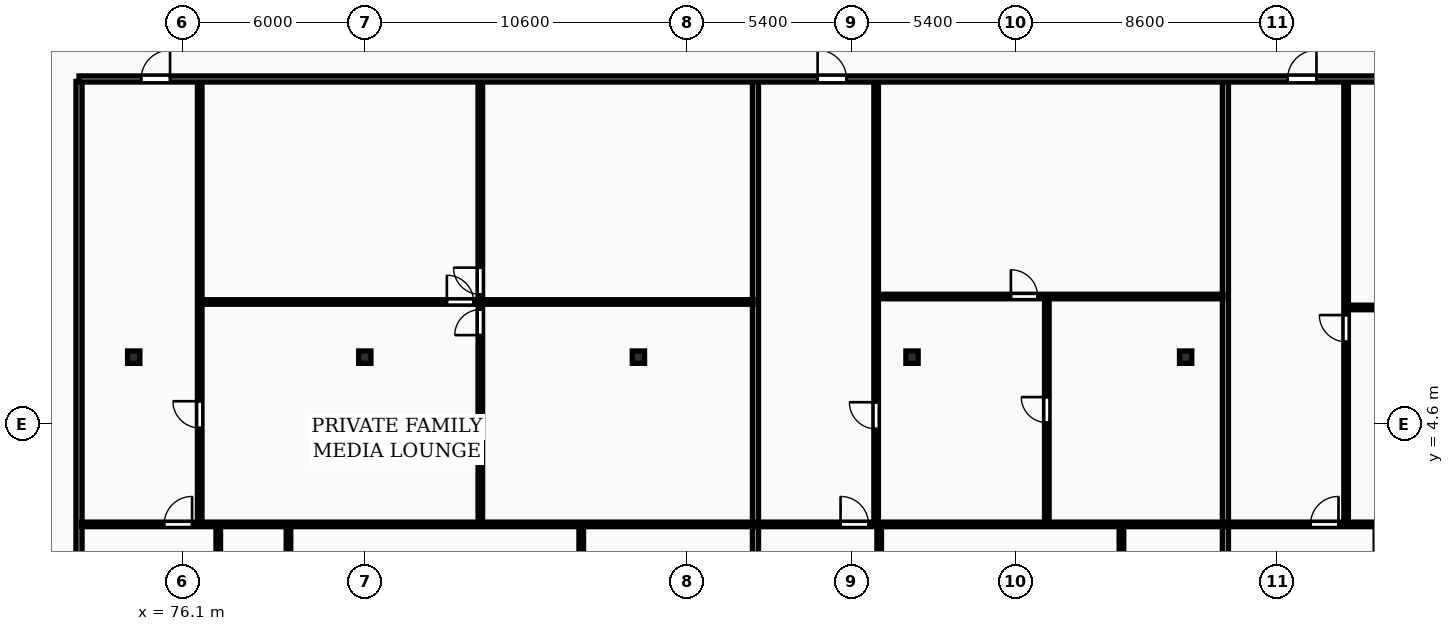
"""IFC4 building model, lengths in metres.
Left out: names, types, materials, properties, quantities, classifications, styles, units other than length and angle.
Written with IfcOpenShell. Run it as: python <this file> out.ifc"""

import sys

from ifc_helpers import new_model, si_unit, direction, frame, frame_2d, origin, origin_2d, place, context, subcontext, project, spatial, rectangle, i_section, extrude, element, fill, save


model = new_model("IFC4")
c1 = context("Model", 3, precision=1e-05, world=origin(), true_north=direction((0.0, 1.0)))
c2 = subcontext(c1, "Body", "Model", "MODEL_VIEW")
j1 = project(units=[si_unit("LENGTHUNIT", "METRE"), si_unit("PLANEANGLEUNIT", "RADIAN")], contexts=[c1])
p1 = place(None, origin())
s1 = spatial("IfcSite", under=j1, at=p1, CompositionType="ELEMENT")
p2 = place(p1, origin())
s2 = spatial("IfcBuilding", under=s1, at=p2, CompositionType="ELEMENT")
p3 = place(p2, frame((0.0, 0.0, 142.9)))
s3 = spatial("IfcBuildingStorey", under=s2, at=p3, CompositionType="ELEMENT", Elevation=142.9)
for number, where, z_axis, x_axis in (
    (1, (74.5, 6.8, 0.0), (0.0, 0.0, 1.0), (1.0, 0.0, 0.0)),
    (2, (82.1, 6.8, 0.0), (0.0, 0.0, 1.0), (1.0, 0.0, 0.0)),
    (3, (91.1, 6.8, 0.0), (0.0, 0.0, 1.0), (1.0, 0.0, 0.0)),
    (4, (100.1, 6.8, 0.0), (0.0, 0.0, 1.0), (1.0, 0.0, 0.0)),
    (5, (109.1, 6.8, 0.0), (0.0, 0.0, 1.0), (1.0, 0.0, 0.0)),
):
    element("IfcColumn", number, at=place(p3, frame(where, z_axis=z_axis, x_axis=x_axis)), inside=s3, PredefinedType="COLUMN", context=c2, shape_type="SweptSolid", body=[
        extrude(i_section(OverallWidth=0.403, OverallDepth=0.406, WebThickness=0.027, FlangeThickness=0.043, FilletRadius=0.015, at=origin_2d()), origin(), (0.0, 0.0, 1.0), 3.6),
    ])
for number, where, z_axis, x_axis in (
    (6, (72.7, -8.7, 0.0), (0.0, 0.0, 1.0), (0.0, 1.0, 0.0)),
    (7, (94.95, -8.7, 0.0), (0.0, 0.0, 1.0), (0.0, 1.0, 0.0)),
):
    element("IfcWall", number, at=place(p3, frame(where, z_axis=z_axis, x_axis=x_axis)), inside=s3, PredefinedType="PARTITIONING", context=c2, shape_type="SweptSolid", body=[
        extrude(rectangle(XDim=24.57, YDim=0.2, at=frame_2d((12.285, 0.0))), origin(), (0.0, 0.0, 1.0), 3.31),
    ])
p4 = place(p3, frame((85.9, 1.34, 0.0), z_axis=(0.0, 0.0, 1.0), x_axis=(0.0, 1.0, 0.0)))
e8 = element("IfcWall", 8, at=p4, inside=s3, PredefinedType="PARTITIONING", context=c2, shape_type="SweptSolid", body=[
    extrude(rectangle(XDim=14.55, YDim=0.15, at=frame_2d((7.275, 0.0))), origin(), (0.0, 0.0, 1.0), 3.31),
])
p5 = place(p4, frame((6.185, 0.0, 0.0)))
e9 = element("IfcOpeningElement", 9, at=p5, cuts=e8, PredefinedType="OPENING", context=c2, shape_type="SweptSolid", body=[
    extrude(rectangle(XDim=0.84, YDim=2.04, at=frame_2d((0.42, 1.02))), frame((0.0, 0.085, 0.0), z_axis=(0.0, -1.0, 0.0), x_axis=(1.0, 0.0, 0.0)), (0.0, 0.0, 1.0), 0.17),
])
p6 = place(p4, frame((7.525, 0.0, 0.0)))
e10 = element("IfcOpeningElement", 10, at=p6, cuts=e8, PredefinedType="OPENING", context=c2, shape_type="SweptSolid", body=[
    extrude(rectangle(XDim=0.88, YDim=2.06, at=frame_2d((0.44, 1.03))), frame((0.0, 0.085, 0.0), z_axis=(0.0, -1.0, 0.0), x_axis=(1.0, 0.0, 0.0)), (0.0, 0.0, 1.0), 0.17),
])
p7 = place(p3, frame((76.73, 8.615, 0.0), z_axis=(0.0, 0.0, 1.0), x_axis=(1.0, 0.0, 0.0)))
e11 = element("IfcWall", 11, at=p7, inside=s3, PredefinedType="PARTITIONING", context=c2, shape_type="SweptSolid", body=[
    extrude(rectangle(XDim=18.14, YDim=0.15, at=frame_2d((9.07, 0.0))), origin(), (0.0, 0.0, 1.0), 3.31),
])
p8 = place(p7, frame((8.07, 0.0, 0.0)))
e12 = element("IfcOpeningElement", 12, at=p8, cuts=e11, PredefinedType="OPENING", context=c2, shape_type="SweptSolid", body=[
    extrude(rectangle(XDim=0.88, YDim=2.06, at=frame_2d((0.44, 1.03))), frame((0.0, 0.085, 0.0), z_axis=(0.0, -1.0, 0.0), x_axis=(1.0, 0.0, 0.0)), (0.0, 0.0, 1.0), 0.17),
])
p9 = place(p3, frame((76.67, 1.34, 0.0), z_axis=(0.0, 0.0, 1.0), x_axis=(0.0, 1.0, 0.0)))
e13 = element("IfcWall", 13, at=p9, inside=s3, PredefinedType="PARTITIONING", context=c2, shape_type="SweptSolid", body=[
    extrude(rectangle(XDim=14.55, YDim=0.15, at=frame_2d((7.275, 0.0))), origin(), (0.0, 0.0, 1.0), 3.31),
])
p10 = place(p9, frame((3.132, 0.0, 0.0)))
e14 = element("IfcOpeningElement", 14, at=p10, cuts=e13, PredefinedType="OPENING", context=c2, shape_type="SweptSolid", body=[
    extrude(rectangle(XDim=0.88, YDim=2.06, at=frame_2d((0.44, 1.03))), frame((0.0, 0.085, 0.0), z_axis=(0.0, -1.0, 0.0), x_axis=(1.0, 0.0, 0.0)), (0.0, 0.0, 1.0), 0.17),
])
p11 = place(p3, frame((79.59, -1.32, 0.0), z_axis=(0.0, 0.0, 1.0), x_axis=(0.0, 1.0, 0.0)))
e15 = element("IfcWall", 15, at=p11, inside=s3, PredefinedType="PARTITIONING", context=c2, shape_type="SweptSolid", body=[
    extrude(rectangle(XDim=2.58, YDim=0.15, at=frame_2d((1.29, 0.0))), origin(), (0.0, 0.0, 1.0), 3.31),
])
p12 = place(p3, frame((77.28, -8.7, 0.0), z_axis=(0.0, 0.0, 1.0), x_axis=(0.0, 1.0, 0.0)))
e16 = element("IfcWall", 16, at=p12, inside=s3, PredefinedType="PARTITIONING", context=c2, shape_type="SweptSolid", body=[
    extrude(rectangle(XDim=9.96, YDim=0.15, at=frame_2d((4.98, 0.0))), origin(), (0.0, 0.0, 1.0), 3.31),
])
p13 = place(p12, frame((5.22, 0.0, 0.0)))
e17 = element("IfcOpeningElement", 17, at=p13, cuts=e16, PredefinedType="OPENING", context=c2, shape_type="SweptSolid", body=[
    extrude(rectangle(XDim=0.92, YDim=2.08, at=frame_2d((0.46, 1.04))), frame((0.0, 0.085, 0.0), z_axis=(0.0, -1.0, 0.0), x_axis=(1.0, 0.0, 0.0)), (0.0, 0.0, 1.0), 0.17),
])
p14 = place(p3, frame((89.22, -1.32, 0.0), z_axis=(0.0, 0.0, 1.0), x_axis=(0.0, 1.0, 0.0)))
e18 = element("IfcWall", 18, at=p14, inside=s3, PredefinedType="PARTITIONING", context=c2, shape_type="SweptSolid", body=[
    extrude(rectangle(XDim=2.58, YDim=0.15, at=frame_2d((1.29, 0.0))), origin(), (0.0, 0.0, 1.0), 3.31),
])
p15 = place(p3, frame((72.78, 1.3, 0.0), z_axis=(0.0, 0.0, 1.0), x_axis=(1.0, 0.0, 0.0)))
e19 = element("IfcWall", 19, at=p15, inside=s3, PredefinedType="PARTITIONING", context=c2, shape_type="SweptSolid", body=[
    extrude(rectangle(XDim=22.09, YDim=0.15, at=frame_2d((11.045, 0.0))), origin(), (0.0, 0.0, 1.0), 3.31),
])
p16 = place(p15, frame((2.72, 0.0, 0.0)))
e20 = element("IfcOpeningElement", 20, at=p16, cuts=e19, PredefinedType="OPENING", context=c2, shape_type="SweptSolid", body=[
    extrude(rectangle(XDim=0.92, YDim=2.08, at=frame_2d((0.46, 1.04))), frame((0.0, 0.085, 0.0), z_axis=(0.0, -1.0, 0.0), x_axis=(1.0, 0.0, 0.0)), (0.0, 0.0, 1.0), 0.17),
])
p17 = place(p3, frame((110.408, -8.7, 0.0), z_axis=(0.0, 0.0, 1.0), x_axis=(0.0, 1.0, 0.0)))
e21 = element("IfcWall", 21, at=p17, inside=s3, PredefinedType="PARTITIONING", context=c2, shape_type="SweptSolid", body=[
    extrude(rectangle(XDim=24.57, YDim=0.2, at=frame_2d((12.285, 0.0))), origin(), (0.0, 0.0, 1.0), 3.31),
])
p18 = place(p3, frame((104.534, 1.34, 0.0), z_axis=(0.0, 0.0, 1.0), x_axis=(0.0, 1.0, 0.0)))
e22 = element("IfcWall", 22, at=p18, inside=s3, PredefinedType="PARTITIONING", context=c2, shape_type="SweptSolid", body=[
    extrude(rectangle(XDim=7.455, YDim=0.15, at=frame_2d((3.728, 0.0))), origin(), (0.0, 0.0, 1.0), 3.31),
])
p19 = place(p18, frame((3.308, 0.0, 0.0)))
e23 = element("IfcOpeningElement", 23, at=p19, cuts=e22, PredefinedType="OPENING", context=c2, shape_type="SweptSolid", body=[
    extrude(rectangle(XDim=0.84, YDim=2.04, at=frame_2d((0.42, 1.02))), frame((0.0, 0.085, 0.0), z_axis=(0.0, -1.0, 0.0), x_axis=(1.0, 0.0, 0.0)), (0.0, 0.0, 1.0), 0.17),
])
p20 = place(p3, frame((98.98, 8.795, 0.0), z_axis=(0.0, 0.0, 1.0), x_axis=(1.0, 0.0, 0.0)))
e24 = element("IfcWall", 24, at=p20, inside=s3, PredefinedType="PARTITIONING", context=c2, shape_type="SweptSolid", body=[
    extrude(rectangle(XDim=11.348, YDim=0.15, at=frame_2d((5.674, 0.0))), origin(), (0.0, 0.0, 1.0), 3.31),
])
p21 = place(p20, frame((4.372, 0.0, 0.0)))
e25 = element("IfcOpeningElement", 25, at=p21, cuts=e24, PredefinedType="OPENING", context=c2, shape_type="SweptSolid", body=[
    extrude(rectangle(XDim=0.88, YDim=2.06, at=frame_2d((0.44, 1.03))), frame((0.0, 0.085, 0.0), z_axis=(0.0, -1.0, 0.0), x_axis=(1.0, 0.0, 0.0)), (0.0, 0.0, 1.0), 0.17),
])
p22 = place(p3, frame((98.92, 1.34, 0.0), z_axis=(0.0, 0.0, 1.0), x_axis=(0.0, 1.0, 0.0)))
e26 = element("IfcWall", 26, at=p22, inside=s3, PredefinedType="PARTITIONING", context=c2, shape_type="SweptSolid", body=[
    extrude(rectangle(XDim=14.55, YDim=0.15, at=frame_2d((7.275, 0.0))), origin(), (0.0, 0.0, 1.0), 3.31),
])
p23 = place(p22, frame((3.098, 0.0, 0.0)))
e27 = element("IfcOpeningElement", 27, at=p23, cuts=e26, PredefinedType="OPENING", context=c2, shape_type="SweptSolid", body=[
    extrude(rectangle(XDim=0.88, YDim=2.06, at=frame_2d((0.44, 1.03))), frame((0.0, 0.085, 0.0), z_axis=(0.0, -1.0, 0.0), x_axis=(1.0, 0.0, 0.0)), (0.0, 0.0, 1.0), 0.17),
])
p24 = place(p3, frame((99.02, -3.74, 0.0), z_axis=(0.0, 0.0, 1.0), x_axis=(0.0, 1.0, 0.0)))
e28 = element("IfcWall", 28, at=p24, inside=s3, PredefinedType="PARTITIONING", context=c2, shape_type="SweptSolid", body=[
    extrude(rectangle(XDim=5.0, YDim=0.15, at=frame_2d((2.5, 0.0))), origin(), (0.0, 0.0, 1.0), 3.31),
])
p25 = place(p24, frame((2.06, 0.0, 0.0)))
e29 = element("IfcOpeningElement", 29, at=p25, cuts=e28, PredefinedType="OPENING", context=c2, shape_type="SweptSolid", body=[
    extrude(rectangle(XDim=0.88, YDim=2.06, at=frame_2d((0.44, 1.03))), frame((0.0, 0.085, 0.0), z_axis=(0.0, -1.0, 0.0), x_axis=(1.0, 0.0, 0.0)), (0.0, 0.0, 1.0), 0.17),
])
p26 = place(p3, frame((106.988, -8.7, 0.0), z_axis=(0.0, 0.0, 1.0), x_axis=(0.0, 1.0, 0.0)))
e30 = element("IfcWall", 30, at=p26, inside=s3, PredefinedType="PARTITIONING", context=c2, shape_type="SweptSolid", body=[
    extrude(rectangle(XDim=9.96, YDim=0.15, at=frame_2d((4.98, 0.0))), origin(), (0.0, 0.0, 1.0), 3.31),
])
p27 = place(p26, frame((5.894, 0.0, 0.0)))
e31 = element("IfcOpeningElement", 31, at=p27, cuts=e30, PredefinedType="OPENING", context=c2, shape_type="SweptSolid", body=[
    extrude(rectangle(XDim=0.84, YDim=2.04, at=frame_2d((0.42, 1.02))), frame((0.0, 0.085, 0.0), z_axis=(0.0, -1.0, 0.0), x_axis=(1.0, 0.0, 0.0)), (0.0, 0.0, 1.0), 0.17),
])
p28 = place(p26, frame((7.69, 0.0, 0.0)))
e32 = element("IfcOpeningElement", 32, at=p28, cuts=e30, PredefinedType="OPENING", context=c2, shape_type="SweptSolid", body=[
    extrude(rectangle(XDim=0.84, YDim=2.04, at=frame_2d((0.42, 1.02))), frame((0.0, 0.085, 0.0), z_axis=(0.0, -1.0, 0.0), x_axis=(1.0, 0.0, 0.0)), (0.0, 0.0, 1.0), 0.17),
])
p29 = place(p26, frame((2.223, 0.0, 0.0)))
e33 = element("IfcOpeningElement", 33, at=p29, cuts=e30, PredefinedType="OPENING", context=c2, shape_type="SweptSolid", body=[
    extrude(rectangle(XDim=0.88, YDim=2.06, at=frame_2d((0.44, 1.03))), frame((0.0, 0.085, 0.0), z_axis=(0.0, -1.0, 0.0), x_axis=(1.0, 0.0, 0.0)), (0.0, 0.0, 1.0), 0.17),
])
p30 = place(p3, frame((95.03, 1.3, 0.0), z_axis=(0.0, 0.0, 1.0), x_axis=(1.0, 0.0, 0.0)))
e34 = element("IfcWall", 34, at=p30, inside=s3, PredefinedType="PARTITIONING", context=c2, shape_type="SweptSolid", body=[
    extrude(rectangle(XDim=15.298, YDim=0.15, at=frame_2d((7.649, 0.0))), origin(), (0.0, 0.0, 1.0), 3.31),
])
p31 = place(p30, frame((2.72, 0.0, 0.0)))
e35 = element("IfcOpeningElement", 35, at=p31, cuts=e34, PredefinedType="OPENING", context=c2, shape_type="SweptSolid", body=[
    extrude(rectangle(XDim=0.92, YDim=2.08, at=frame_2d((0.46, 1.04))), frame((0.0, 0.085, 0.0), z_axis=(0.0, -1.0, 0.0), x_axis=(1.0, 0.0, 0.0)), (0.0, 0.0, 1.0), 0.17),
])
p32 = place(p3, frame((114.438, 8.435, 0.0), z_axis=(0.0, 0.0, 1.0), x_axis=(1.0, 0.0, 0.0)))
e36 = element("IfcWall", 36, at=p32, inside=s3, PredefinedType="PARTITIONING", context=c2, shape_type="SweptSolid", body=[
    extrude(rectangle(XDim=16.182, YDim=0.15, at=frame_2d((8.091, 0.0))), origin(), (0.0, 0.0, 1.0), 3.31),
])
p33 = place(p32, frame((6.821, 0.0, 0.0)))
e37 = element("IfcOpeningElement", 37, at=p33, cuts=e36, PredefinedType="OPENING", context=c2, shape_type="SweptSolid", body=[
    extrude(rectangle(XDim=0.88, YDim=2.06, at=frame_2d((0.44, 1.03))), frame((0.0, 0.085, 0.0), z_axis=(0.0, -1.0, 0.0), x_axis=(1.0, 0.0, 0.0)), (0.0, 0.0, 1.0), 0.17),
])
p34 = place(p3, frame((114.378, 1.34, 0.0), z_axis=(0.0, 0.0, 1.0), x_axis=(0.0, 1.0, 0.0)))
e38 = element("IfcWall", 38, at=p34, inside=s3, PredefinedType="PARTITIONING", context=c2, shape_type="SweptSolid", body=[
    extrude(rectangle(XDim=14.55, YDim=0.15, at=frame_2d((7.275, 0.0))), origin(), (0.0, 0.0, 1.0), 3.31),
])
p35 = place(p34, frame((5.965, 0.0, 0.0)))
e39 = element("IfcOpeningElement", 39, at=p35, cuts=e38, PredefinedType="OPENING", context=c2, shape_type="SweptSolid", body=[
    extrude(rectangle(XDim=0.88, YDim=2.06, at=frame_2d((0.44, 1.03))), frame((0.0, 0.085, 0.0), z_axis=(0.0, -1.0, 0.0), x_axis=(1.0, 0.0, 0.0)), (0.0, 0.0, 1.0), 0.17),
])
p36 = place(p3, frame((110.488, 1.3, 0.0), z_axis=(0.0, 0.0, 1.0), x_axis=(1.0, 0.0, 0.0)))
e40 = element("IfcWall", 40, at=p36, inside=s3, PredefinedType="PARTITIONING", context=c2, shape_type="SweptSolid", body=[
    extrude(rectangle(XDim=20.132, YDim=0.15, at=frame_2d((10.066, 0.0))), origin(), (0.0, 0.0, 1.0), 3.31),
])
p37 = place(p36, frame((2.72, 0.0, 0.0)))
e41 = element("IfcOpeningElement", 41, at=p37, cuts=e40, PredefinedType="OPENING", context=c2, shape_type="SweptSolid", body=[
    extrude(rectangle(XDim=0.92, YDim=2.08, at=frame_2d((0.46, 1.04))), frame((0.0, 0.085, 0.0), z_axis=(0.0, -1.0, 0.0), x_axis=(1.0, 0.0, 0.0)), (0.0, 0.0, 1.0), 0.17),
])
p38 = place(p3, frame((72.7, 15.95, 0.0), z_axis=(0.0, 0.0, 1.0), x_axis=(1.0, 0.0, 0.0)))
e42 = element("IfcWall", 42, at=p38, inside=s3, PredefinedType="PARTITIONING", context=c2, shape_type="SweptSolid", body=[
    extrude(rectangle(XDim=58.0, YDim=0.2, at=frame_2d((29.0, 0.0))), origin(), (0.0, 0.0, 1.0), 3.31),
])
p39 = place(p38, frame((2.045, 0.0, 0.0)))
e43 = element("IfcOpeningElement", 43, at=p39, cuts=e42, PredefinedType="OPENING", context=c2, shape_type="SweptSolid", body=[
    extrude(rectangle(XDim=0.95, YDim=2.15, at=frame_2d((0.475, 1.075))), frame((0.0, 0.11, 0.0), z_axis=(0.0, -1.0, 0.0), x_axis=(1.0, 0.0, 0.0)), (0.0, 0.0, 1.0), 0.22),
])
p40 = place(p38, frame((24.295, 0.0, 0.0)))
e44 = element("IfcOpeningElement", 44, at=p40, cuts=e42, PredefinedType="OPENING", context=c2, shape_type="SweptSolid", body=[
    extrude(rectangle(XDim=0.95, YDim=2.15, at=frame_2d((0.475, 1.075))), frame((0.0, 0.11, 0.0), z_axis=(0.0, -1.0, 0.0), x_axis=(1.0, 0.0, 0.0)), (0.0, 0.0, 1.0), 0.22),
])
p41 = place(p38, frame((39.753, 0.0, 0.0)))
e45 = element("IfcOpeningElement", 45, at=p41, cuts=e42, PredefinedType="OPENING", context=c2, shape_type="SweptSolid", body=[
    extrude(rectangle(XDim=0.95, YDim=2.15, at=frame_2d((0.475, 1.075))), frame((0.0, 0.11, 0.0), z_axis=(0.0, -1.0, 0.0), x_axis=(1.0, 0.0, 0.0)), (0.0, 0.0, 1.0), 0.22),
])
p42 = place(p5, origin())
e46 = element("IfcDoor", 46, at=p42, inside=s3, OperationType="SINGLE_SWING_LEFT", PredefinedType="DOOR", context=c2, shape_type="SweptSolid", body=[
    extrude(rectangle(XDim=0.84, YDim=2.04, at=frame_2d((0.42, 1.02))), frame((0.0, 0.025, 0.0), z_axis=(0.0, -1.0, 0.0), x_axis=(1.0, 0.0, 0.0)), (0.0, 0.0, 1.0), 0.05),
])
fill(e9, e46)
p43 = place(p6, origin())
e47 = element("IfcDoor", 47, at=p43, inside=s3, OperationType="SINGLE_SWING_RIGHT", PredefinedType="DOOR", context=c2, shape_type="SweptSolid", body=[
    extrude(rectangle(XDim=0.88, YDim=2.06, at=frame_2d((0.44, 1.03))), frame((0.0, 0.025, 0.0), z_axis=(0.0, -1.0, 0.0), x_axis=(1.0, 0.0, 0.0)), (0.0, 0.0, 1.0), 0.05),
])
fill(e10, e47)
p44 = place(p8, origin())
e48 = element("IfcDoor", 48, at=p44, inside=s3, OperationType="SINGLE_SWING_LEFT", PredefinedType="DOOR", context=c2, shape_type="SweptSolid", body=[
    extrude(rectangle(XDim=0.88, YDim=2.06, at=frame_2d((0.44, 1.03))), frame((0.0, 0.025, 0.0), z_axis=(0.0, -1.0, 0.0), x_axis=(1.0, 0.0, 0.0)), (0.0, 0.0, 1.0), 0.05),
])
fill(e12, e48)
p45 = place(p10, origin())
e49 = element("IfcDoor", 49, at=p45, inside=s3, OperationType="SINGLE_SWING_RIGHT", PredefinedType="DOOR", context=c2, shape_type="SweptSolid", body=[
    extrude(rectangle(XDim=0.88, YDim=2.06, at=frame_2d((0.44, 1.03))), frame((0.0, 0.025, 0.0), z_axis=(0.0, -1.0, 0.0), x_axis=(1.0, 0.0, 0.0)), (0.0, 0.0, 1.0), 0.05),
])
fill(e14, e49)
p46 = place(p16, origin())
e50 = element("IfcDoor", 50, at=p46, inside=s3, OperationType="SINGLE_SWING_RIGHT", PredefinedType="DOOR", context=c2, shape_type="SweptSolid", body=[
    extrude(rectangle(XDim=0.92, YDim=2.08, at=frame_2d((0.46, 1.04))), frame((0.0, 0.025, 0.0), z_axis=(0.0, -1.0, 0.0), x_axis=(1.0, 0.0, 0.0)), (0.0, 0.0, 1.0), 0.05),
])
fill(e20, e50)
p47 = place(p19, origin())
e51 = element("IfcDoor", 51, at=p47, inside=s3, OperationType="SINGLE_SWING_RIGHT", PredefinedType="DOOR", context=c2, shape_type="SweptSolid", body=[
    extrude(rectangle(XDim=0.84, YDim=2.04, at=frame_2d((0.42, 1.02))), frame((0.0, 0.025, 0.0), z_axis=(0.0, -1.0, 0.0), x_axis=(1.0, 0.0, 0.0)), (0.0, 0.0, 1.0), 0.05),
])
fill(e23, e51)
p48 = place(p21, origin())
e52 = element("IfcDoor", 52, at=p48, inside=s3, OperationType="SINGLE_SWING_LEFT", PredefinedType="DOOR", context=c2, shape_type="SweptSolid", body=[
    extrude(rectangle(XDim=0.88, YDim=2.06, at=frame_2d((0.44, 1.03))), frame((0.0, 0.025, 0.0), z_axis=(0.0, -1.0, 0.0), x_axis=(1.0, 0.0, 0.0)), (0.0, 0.0, 1.0), 0.05),
])
fill(e25, e52)
p49 = place(p23, origin())
e53 = element("IfcDoor", 53, at=p49, inside=s3, OperationType="SINGLE_SWING_RIGHT", PredefinedType="DOOR", context=c2, shape_type="SweptSolid", body=[
    extrude(rectangle(XDim=0.88, YDim=2.06, at=frame_2d((0.44, 1.03))), frame((0.0, 0.025, 0.0), z_axis=(0.0, -1.0, 0.0), x_axis=(1.0, 0.0, 0.0)), (0.0, 0.0, 1.0), 0.05),
])
fill(e27, e53)
p50 = place(p31, origin())
e54 = element("IfcDoor", 54, at=p50, inside=s3, OperationType="SINGLE_SWING_LEFT", PredefinedType="DOOR", context=c2, shape_type="SweptSolid", body=[
    extrude(rectangle(XDim=0.92, YDim=2.08, at=frame_2d((0.46, 1.04))), frame((0.0, 0.025, 0.0), z_axis=(0.0, -1.0, 0.0), x_axis=(1.0, 0.0, 0.0)), (0.0, 0.0, 1.0), 0.05),
])
fill(e35, e54)
p51 = place(p35, origin())
e55 = element("IfcDoor", 55, at=p51, inside=s3, OperationType="SINGLE_SWING_RIGHT", PredefinedType="DOOR", context=c2, shape_type="SweptSolid", body=[
    extrude(rectangle(XDim=0.88, YDim=2.06, at=frame_2d((0.44, 1.03))), frame((0.0, 0.025, 0.0), z_axis=(0.0, -1.0, 0.0), x_axis=(1.0, 0.0, 0.0)), (0.0, 0.0, 1.0), 0.05),
])
fill(e39, e55)
p52 = place(p37, origin())
e56 = element("IfcDoor", 56, at=p52, inside=s3, OperationType="SINGLE_SWING_RIGHT", PredefinedType="DOOR", context=c2, shape_type="SweptSolid", body=[
    extrude(rectangle(XDim=0.92, YDim=2.08, at=frame_2d((0.46, 1.04))), frame((0.0, 0.025, 0.0), z_axis=(0.0, -1.0, 0.0), x_axis=(1.0, 0.0, 0.0)), (0.0, 0.0, 1.0), 0.05),
])
fill(e41, e56)
p53 = place(p39, origin())
e57 = element("IfcDoor", 57, at=p53, inside=s3, OperationType="SINGLE_SWING_RIGHT", PredefinedType="DOOR", context=c2, shape_type="SweptSolid", body=[
    extrude(rectangle(XDim=0.95, YDim=2.15, at=frame_2d((0.475, 1.075))), frame((0.0, 0.025, 0.0), z_axis=(0.0, -1.0, 0.0), x_axis=(1.0, 0.0, 0.0)), (0.0, 0.0, 1.0), 0.05),
])
fill(e43, e57)
p54 = place(p40, origin())
e58 = element("IfcDoor", 58, at=p54, inside=s3, OperationType="SINGLE_SWING_LEFT", PredefinedType="DOOR", context=c2, shape_type="SweptSolid", body=[
    extrude(rectangle(XDim=0.95, YDim=2.15, at=frame_2d((0.475, 1.075))), frame((0.0, 0.025, 0.0), z_axis=(0.0, -1.0, 0.0), x_axis=(1.0, 0.0, 0.0)), (0.0, 0.0, 1.0), 0.05),
])
fill(e44, e58)
p55 = place(p41, origin())
e59 = element("IfcDoor", 59, at=p55, inside=s3, OperationType="SINGLE_SWING_RIGHT", PredefinedType="DOOR", context=c2, shape_type="SweptSolid", body=[
    extrude(rectangle(XDim=0.95, YDim=2.15, at=frame_2d((0.475, 1.075))), frame((0.0, 0.025, 0.0), z_axis=(0.0, -1.0, 0.0), x_axis=(1.0, 0.0, 0.0)), (0.0, 0.0, 1.0), 0.05),
])
fill(e45, e59)
save(model, sys.argv[1])
